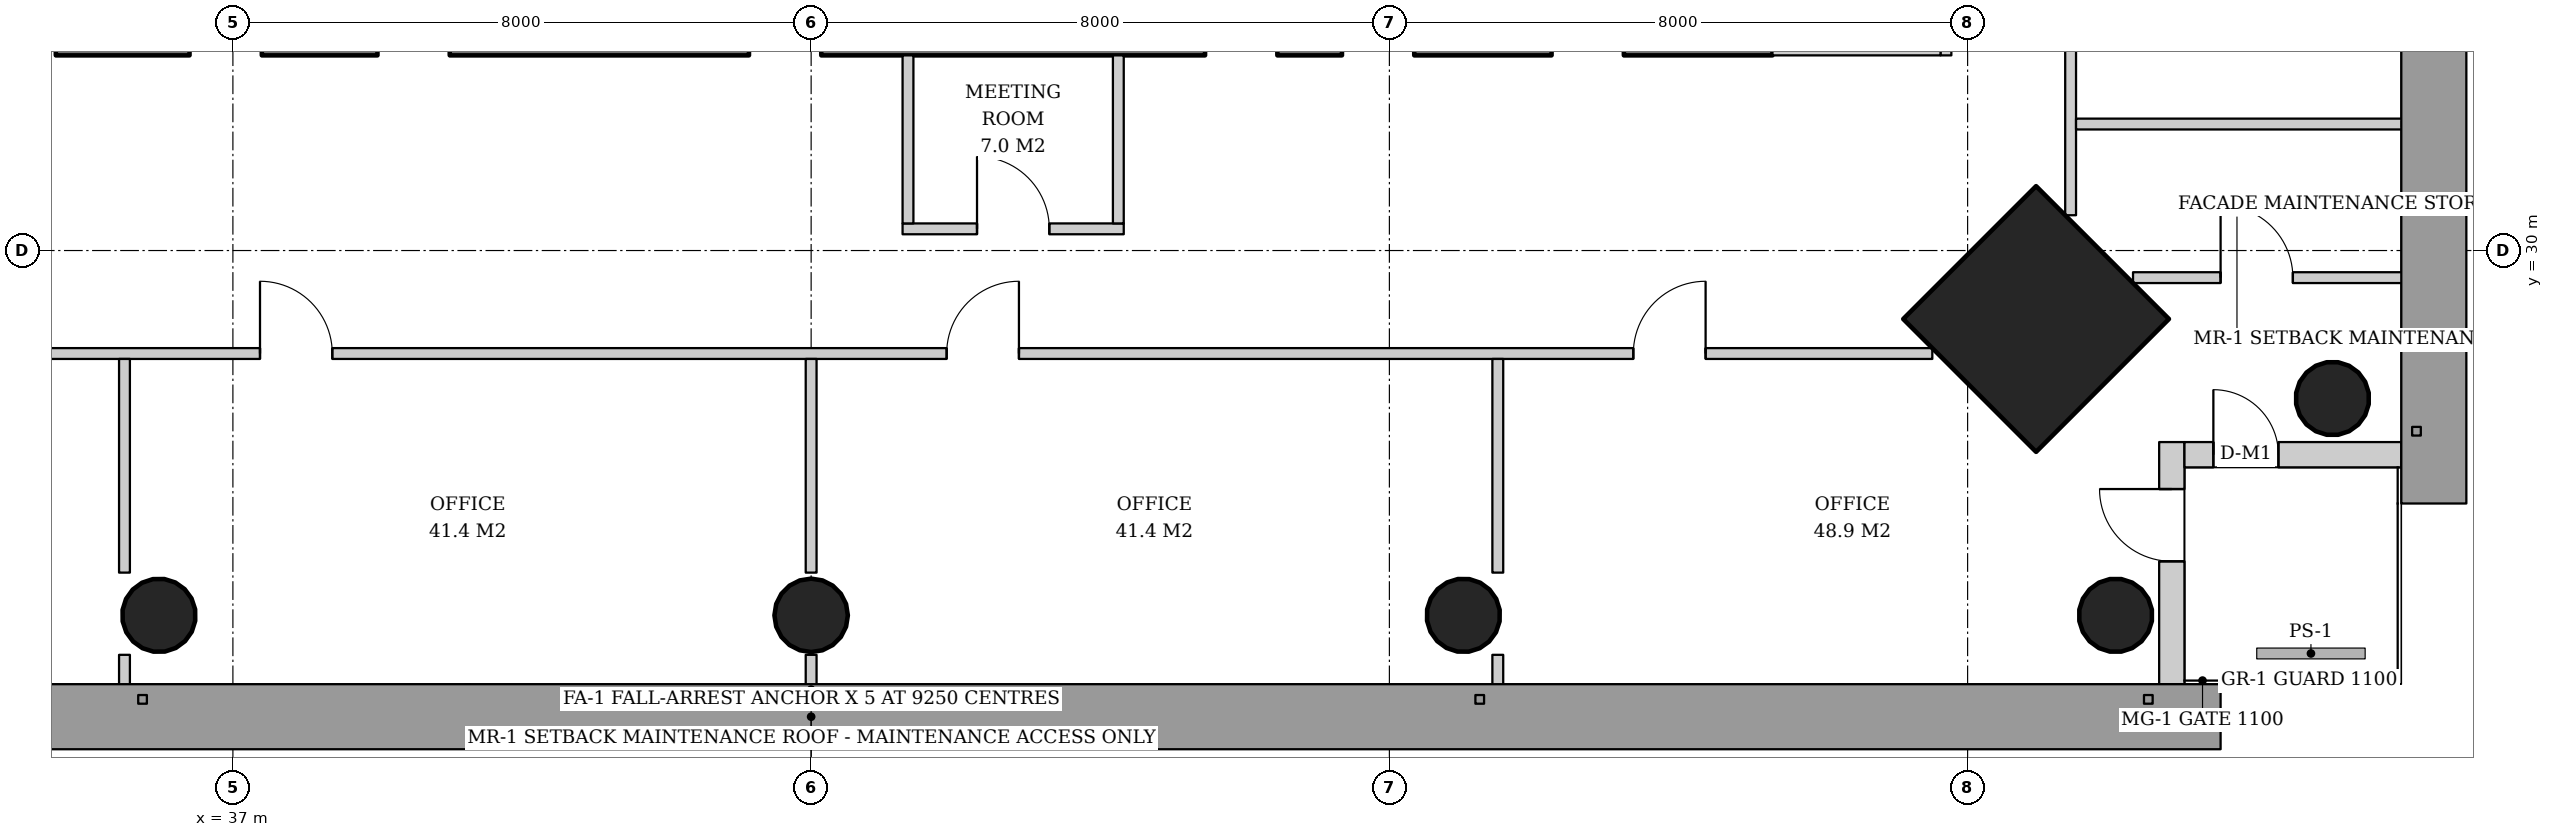
"""IFC4 building model, lengths in metres.
Left out: names, types, materials, properties, quantities, classifications, styles, units other than length and angle.
Written with IfcOpenShell. Run it as: python <this file> out.ifc"""

import sys

from ifc_helpers import new_model, si_unit, direction, frame, frame_2d, origin, origin_2d, place, context, subcontext, project, spatial, rectangle, hollow_circle, extrude, element, fill, save


model = new_model("IFC4")
c1 = context("Model", 3, precision=1e-05, world=origin(), true_north=direction((0.0, 1.0)))
c2 = subcontext(c1, "Body", "Model", "MODEL_VIEW")
j1 = project(units=[si_unit("LENGTHUNIT", "METRE"), si_unit("PLANEANGLEUNIT", "RADIAN")], contexts=[c1])
p1 = place(None, origin())
s1 = spatial("IfcSite", under=j1, at=p1, CompositionType="ELEMENT")
p2 = place(p1, origin())
s2 = spatial("IfcBuilding", under=s1, at=p2, CompositionType="ELEMENT")
p3 = place(p2, frame((0.0, 0.0, 112.2)))
s3 = spatial("IfcBuildingStorey", under=s2, at=p3, CompositionType="ELEMENT", Elevation=112.2)
p4 = place(p3, frame((66.086, 27.914, 0.0), z_axis=(-0.031898107953, 0.031898107953, 0.998981992539), x_axis=(-0.707106781187, -0.707106781187, 0.0)))
e1 = element("IfcColumn", 1, at=p4, inside=s3, PredefinedType="COLUMN", context=c2, shape_type="SweptSolid", body=[
    extrude(hollow_circle(Radius=0.508, WallThickness=0.04, at=origin_2d()), origin(), (0.0, 0.0, 1.0), 3.804),
])
p5 = place(p3, frame((61.986, 29.014, 0.0), z_axis=(-0.031898107953, 0.031898107953, 0.998981992539), x_axis=(-0.707106781187, -0.707106781187, 0.0)))
e2 = element("IfcColumn", 2, at=p5, inside=s3, PredefinedType="COLUMN", context=c2, shape_type="SweptSolid", body=[
    extrude(rectangle(XDim=2.6, YDim=2.6, at=origin_2d()), origin(), (0.0, 0.0, 1.0), 3.804),
])
p6 = place(p3, frame((63.086, 24.914, 0.0), z_axis=(-0.031898107953, 0.031898107953, 0.998981992539), x_axis=(-0.707106781187, -0.707106781187, 0.0)))
e3 = element("IfcColumn", 3, at=p6, inside=s3, PredefinedType="COLUMN", context=c2, shape_type="SweptSolid", body=[
    extrude(hollow_circle(Radius=0.508, WallThickness=0.04, at=origin_2d()), origin(), (0.0, 0.0, 1.0), 3.804),
])
p7 = place(p3, frame((35.957, 24.914, 0.0), z_axis=(0.015987237665, 0.031910269556, 0.999362868496), x_axis=(-0.894067115991, 0.447933021895, 0.0)))
e4 = element("IfcColumn", 4, at=p7, inside=s3, PredefinedType="COLUMN", context=c2, shape_type="SweptSolid", body=[
    extrude(hollow_circle(Radius=0.508, WallThickness=0.04, at=origin_2d()), origin(), (0.0, 0.0, 1.0), 3.802),
])
p8 = place(p3, frame((45.0, 24.914, 0.0), z_axis=(0.0, 0.031914348339, 0.999490607445), x_axis=(-1.0, 0.0, 0.0)))
e5 = element("IfcColumn", 5, at=p8, inside=s3, PredefinedType="COLUMN", context=c2, shape_type="SweptSolid", body=[
    extrude(hollow_circle(Radius=0.508, WallThickness=0.04, at=origin_2d()), origin(), (0.0, 0.0, 1.0), 3.802),
])
p9 = place(p3, frame((54.043, 24.914, 0.0), z_axis=(-0.015987237665, 0.031910269556, 0.999362868496), x_axis=(-0.894067115991, -0.447933021895, 0.0)))
e6 = element("IfcColumn", 6, at=p9, inside=s3, PredefinedType="COLUMN", context=c2, shape_type="SweptSolid", body=[
    extrude(hollow_circle(Radius=0.508, WallThickness=0.04, at=origin_2d()), origin(), (0.0, 0.0, 1.0), 3.802),
])
p10 = place(p3, frame((31.7, 33.05, 0.0), z_axis=(0.0, 0.0, 1.0), x_axis=(1.0, 0.0, 0.0)))
e7 = element("IfcWall", 7, at=p10, inside=s3, PredefinedType="SHEAR", context=c2, shape_type="SweptSolid", body=[
    extrude(rectangle(XDim=26.6, YDim=0.7, at=frame_2d((13.3, 0.0))), origin(), (0.0, 0.0, 1.0), 3.8),
])
p11 = place(p10, frame((7.3, 0.0, 0.0)))
e8 = element("IfcOpeningElement", 8, at=p11, cuts=e7, PredefinedType="OPENING", context=c2, shape_type="SweptSolid", body=[
    extrude(rectangle(XDim=1.0, YDim=2.1, at=frame_2d((0.5, 1.05))), frame((0.0, 0.36, 0.0), z_axis=(0.0, -1.0, 0.0), x_axis=(1.0, 0.0, 0.0)), (0.0, 0.0, 1.0), 0.72),
])
p12 = place(p10, frame((18.75, 0.0, 0.0)))
e9 = element("IfcOpeningElement", 9, at=p12, cuts=e7, PredefinedType="OPENING", context=c2, shape_type="SweptSolid", body=[
    extrude(rectangle(XDim=1.0, YDim=2.1, at=frame_2d((0.5, 1.05))), frame((0.0, 0.36, 0.0), z_axis=(0.0, -1.0, 0.0), x_axis=(1.0, 0.0, 0.0)), (0.0, 0.0, 1.0), 0.72),
])
p13 = place(p10, frame((1.85, 0.0, 0.0)))
e10 = element("IfcOpeningElement", 10, at=p13, cuts=e7, PredefinedType="OPENING", context=c2, shape_type="SweptSolid", body=[
    extrude(rectangle(XDim=1.0, YDim=2.1, at=frame_2d((0.5, 1.05))), frame((0.0, 0.36, 0.0), z_axis=(0.0, -1.0, 0.0), x_axis=(1.0, 0.0, 0.0)), (0.0, 0.0, 1.0), 0.72),
])
p14 = place(p10, frame((4.7, 0.0, 0.0)))
e11 = element("IfcOpeningElement", 11, at=p14, cuts=e7, PredefinedType="OPENING", context=c2, shape_type="SweptSolid", body=[
    extrude(rectangle(XDim=1.0, YDim=2.1, at=frame_2d((0.5, 1.05))), frame((0.0, 0.36, 0.0), z_axis=(0.0, -1.0, 0.0), x_axis=(1.0, 0.0, 0.0)), (0.0, 0.0, 1.0), 0.72),
])
p15 = place(p10, frame((12.44, 0.0, 0.0)))
e12 = element("IfcOpeningElement", 12, at=p15, cuts=e7, PredefinedType="OPENING", context=c2, shape_type="SweptSolid", body=[
    extrude(rectangle(XDim=1.0, YDim=2.1, at=frame_2d((0.5, 1.05))), frame((0.0, 0.36, 0.0), z_axis=(0.0, -1.0, 0.0), x_axis=(1.0, 0.0, 0.0)), (0.0, 0.0, 1.0), 0.72),
])
p16 = place(p10, frame((20.644, 0.0, 0.0)))
e13 = element("IfcOpeningElement", 13, at=p16, cuts=e7, PredefinedType="OPENING", context=c2, shape_type="SweptSolid", body=[
    extrude(rectangle(XDim=1.0, YDim=2.1, at=frame_2d((0.5, 1.05))), frame((0.0, 0.36, 0.0), z_axis=(0.0, -1.0, 0.0), x_axis=(1.0, 0.0, 0.0)), (0.0, 0.0, 1.0), 0.72),
])
p17 = place(p10, frame((23.544, 0.0, 0.0)))
e14 = element("IfcOpeningElement", 14, at=p17, cuts=e7, PredefinedType="OPENING", context=c2, shape_type="SweptSolid", body=[
    extrude(rectangle(XDim=1.0, YDim=2.1, at=frame_2d((0.5, 1.05))), frame((0.0, 0.36, 0.0), z_axis=(0.0, -1.0, 0.0), x_axis=(1.0, 0.0, 0.0)), (0.0, 0.0, 1.0), 0.72),
])
p18 = place(p3, frame((63.825, 24.0, 0.0), z_axis=(0.0, 0.0, 1.0), x_axis=(0.0, 1.0, 0.0)))
e15 = element("IfcWall", 15, at=p18, inside=s3, PredefinedType="SOLIDWALL", context=c2, shape_type="SweptSolid", body=[
    extrude(rectangle(XDim=3.35, YDim=0.35, at=frame_2d((1.675, 0.0))), origin(), (0.0, 0.0, 1.0), 3.62),
])
p19 = place(p18, frame((1.7, 0.0, 0.0)))
e16 = element("IfcOpeningElement", 16, at=p19, cuts=e15, PredefinedType="OPENING", context=c2, shape_type="SweptSolid", body=[
    extrude(rectangle(XDim=1.0, YDim=2.4, at=frame_2d((0.5, 1.2))), frame((0.0, 0.185, 0.0), z_axis=(0.0, -1.0, 0.0), x_axis=(1.0, 0.0, 0.0)), (0.0, 0.0, 1.0), 0.37),
])
p20 = place(p3, frame((64.0, 27.175, 0.0), z_axis=(0.0, 0.0, 1.0), x_axis=(1.0, 0.0, 0.0)))
e17 = element("IfcWall", 17, at=p20, inside=s3, PredefinedType="SOLIDWALL", context=c2, shape_type="SweptSolid", body=[
    extrude(rectangle(XDim=3.0, YDim=0.35, at=frame_2d((1.5, 0.0))), origin(), (0.0, 0.0, 1.0), 3.62),
])
p21 = place(p20, frame((0.4, 0.0, 0.0)))
e18 = element("IfcOpeningElement", 18, at=p21, cuts=e17, PredefinedType="OPENING", context=c2, shape_type="SweptSolid", body=[
    extrude(rectangle(XDim=0.9, YDim=2.1, at=frame_2d((0.45, 1.05))), frame((0.0, 0.185, 0.0), z_axis=(0.0, -1.0, 0.0), x_axis=(1.0, 0.0, 0.0)), (0.0, 0.0, 1.0), 0.37),
])
p22 = place(p3, frame((60.7, 32.7, 0.0), z_axis=(0.0, 0.0, 1.0), x_axis=(0.0, 1.0, 0.0)))
e19 = element("IfcWall", 19, at=p22, inside=s3, PredefinedType="PARTITIONING", context=c2, shape_type="SweptSolid", body=[
    extrude(rectangle(XDim=11.275, YDim=0.15, at=frame_2d((5.638, 0.0))), origin(), (0.0, 0.0, 1.0), 2.72),
])
p23 = place(p22, frame((5.137, 0.0, 0.0)))
e20 = element("IfcOpeningElement", 20, at=p23, cuts=e19, PredefinedType="OPENING", context=c2, shape_type="SweptSolid", body=[
    extrude(rectangle(XDim=1.0, YDim=2.1, at=frame_2d((0.5, 1.05))), frame((0.0, 0.085, 0.0), z_axis=(0.0, -1.0, 0.0), x_axis=(1.0, 0.0, 0.0)), (0.0, 0.0, 1.0), 0.17),
])
p24 = place(p3, frame((58.3, 32.775, 0.0), z_axis=(0.0, 0.0, 1.0), x_axis=(1.0, 0.0, 0.0)))
e21 = element("IfcWall", 21, at=p24, inside=s3, PredefinedType="PARTITIONING", context=c2, shape_type="SweptSolid", body=[
    extrude(rectangle(XDim=2.325, YDim=0.15, at=frame_2d((1.163, 0.0))), origin(), (0.0, 0.0, 1.0), 3.62),
])
p25 = place(p3, frame((46.265, 30.3, 0.0), z_axis=(0.0, 0.0, 1.0), x_axis=(1.0, 0.0, 0.0)))
e22 = element("IfcWall", 22, at=p25, inside=s3, PredefinedType="PARTITIONING", context=c2, shape_type="SweptSolid", body=[
    extrude(rectangle(XDim=3.06, YDim=0.15, at=frame_2d((1.53, 0.0))), origin(), (0.0, 0.0, 1.0), 2.858),
])
p26 = place(p25, frame((1.03, 0.0, 0.0)))
e23 = element("IfcOpeningElement", 23, at=p26, cuts=e22, PredefinedType="OPENING", context=c2, shape_type="SweptSolid", body=[
    extrude(rectangle(XDim=1.0, YDim=2.1, at=frame_2d((0.5, 1.05))), frame((0.0, 0.085, 0.0), z_axis=(0.0, -1.0, 0.0), x_axis=(1.0, 0.0, 0.0)), (0.0, 0.0, 1.0), 0.17),
])
for number, where, z_axis, x_axis in (
    (24, (46.34, 32.7, 0.0), (0.0, 0.0, 1.0), (0.0, -1.0, 0.0)),
    (25, (49.25, 32.7, 0.0), (0.0, 0.0, 1.0), (0.0, -1.0, 0.0)),
):
    element("IfcWall", number, at=place(p3, frame(where, z_axis=z_axis, x_axis=x_axis)), inside=s3, PredefinedType="PARTITIONING", context=c2, shape_type="SweptSolid", body=[
        extrude(rectangle(XDim=2.325, YDim=0.15, at=frame_2d((1.163, 0.0))), origin(), (0.0, 0.0, 1.0), 3.62),
    ])
p27 = place(p3, frame((62.425, 30.489, 0.0), z_axis=(0.0, 0.0, 1.0), x_axis=(0.0, 1.0, 0.0)))
e26 = element("IfcWall", 26, at=p27, inside=s3, PredefinedType="PARTITIONING", context=c2, shape_type="SweptSolid", body=[
    extrude(rectangle(XDim=31.023, YDim=0.15, at=frame_2d((15.511, 0.0))), origin(), (0.0, 0.0, 1.0), 2.72),
])
p28 = place(p27, frame((3.136, 0.0, 0.0)))
e27 = element("IfcOpeningElement", 27, at=p28, cuts=e26, PredefinedType="OPENING", context=c2, shape_type="SweptSolid", body=[
    extrude(rectangle(XDim=1.0, YDim=2.1, at=frame_2d((0.5, 1.05))), frame((0.0, 0.085, 0.0), z_axis=(0.0, -1.0, 0.0), x_axis=(1.0, 0.0, 0.0)), (0.0, 0.0, 1.0), 0.17),
])
p29 = place(p27, frame((7.886, 0.0, 0.0)))
e28 = element("IfcOpeningElement", 28, at=p29, cuts=e26, PredefinedType="OPENING", context=c2, shape_type="SweptSolid", body=[
    extrude(rectangle(XDim=1.0, YDim=2.1, at=frame_2d((0.5, 1.05))), frame((0.0, 0.085, 0.0), z_axis=(0.0, -1.0, 0.0), x_axis=(1.0, 0.0, 0.0)), (0.0, 0.0, 1.0), 0.17),
])
p30 = place(p27, frame((12.636, 0.0, 0.0)))
e29 = element("IfcOpeningElement", 29, at=p30, cuts=e26, PredefinedType="OPENING", context=c2, shape_type="SweptSolid", body=[
    extrude(rectangle(XDim=1.0, YDim=2.1, at=frame_2d((0.5, 1.05))), frame((0.0, 0.085, 0.0), z_axis=(0.0, -1.0, 0.0), x_axis=(1.0, 0.0, 0.0)), (0.0, 0.0, 1.0), 0.17),
])
p31 = place(p27, frame((17.386, 0.0, 0.0)))
e30 = element("IfcOpeningElement", 30, at=p31, cuts=e26, PredefinedType="OPENING", context=c2, shape_type="SweptSolid", body=[
    extrude(rectangle(XDim=1.0, YDim=2.1, at=frame_2d((0.5, 1.05))), frame((0.0, 0.085, 0.0), z_axis=(0.0, -1.0, 0.0), x_axis=(1.0, 0.0, 0.0)), (0.0, 0.0, 1.0), 0.17),
])
p32 = place(p27, frame((22.136, 0.0, 0.0)))
e31 = element("IfcOpeningElement", 31, at=p32, cuts=e26, PredefinedType="OPENING", context=c2, shape_type="SweptSolid", body=[
    extrude(rectangle(XDim=1.0, YDim=2.1, at=frame_2d((0.5, 1.05))), frame((0.0, 0.085, 0.0), z_axis=(0.0, -1.0, 0.0), x_axis=(1.0, 0.0, 0.0)), (0.0, 0.0, 1.0), 0.17),
])
p33 = place(p3, frame((62.5, 31.75, 0.0), z_axis=(0.0, 0.0, 1.0), x_axis=(1.0, 0.0, 0.0)))
e32 = element("IfcWall", 32, at=p33, inside=s3, PredefinedType="PARTITIONING", context=c2, shape_type="SweptSolid", body=[
    extrude(rectangle(XDim=4.54, YDim=0.15, at=frame_2d((2.27, 0.0))), origin(), (0.0, 0.0, 1.0), 2.82),
])
p34 = place(p3, frame((29.489, 28.575, 0.0), z_axis=(0.0, 0.0, 1.0), x_axis=(1.0, 0.0, 0.0)))
e33 = element("IfcWall", 33, at=p34, inside=s3, PredefinedType="PARTITIONING", context=c2, shape_type="SweptSolid", body=[
    extrude(rectangle(XDim=31.023, YDim=0.15, at=frame_2d((15.511, 0.0))), origin(), (0.0, 0.0, 1.0), 2.72),
])
p35 = place(p34, frame((3.136, 0.0, 0.0)))
e34 = element("IfcOpeningElement", 34, at=p35, cuts=e33, PredefinedType="OPENING", context=c2, shape_type="SweptSolid", body=[
    extrude(rectangle(XDim=1.0, YDim=2.1, at=frame_2d((0.5, 1.05))), frame((0.0, 0.085, 0.0), z_axis=(0.0, -1.0, 0.0), x_axis=(1.0, 0.0, 0.0)), (0.0, 0.0, 1.0), 0.17),
])
p36 = place(p34, frame((7.886, 0.0, 0.0)))
e35 = element("IfcOpeningElement", 35, at=p36, cuts=e33, PredefinedType="OPENING", context=c2, shape_type="SweptSolid", body=[
    extrude(rectangle(XDim=1.0, YDim=2.1, at=frame_2d((0.5, 1.05))), frame((0.0, 0.085, 0.0), z_axis=(0.0, -1.0, 0.0), x_axis=(1.0, 0.0, 0.0)), (0.0, 0.0, 1.0), 0.17),
])
p37 = place(p34, frame((17.386, 0.0, 0.0)))
e36 = element("IfcOpeningElement", 36, at=p37, cuts=e33, PredefinedType="OPENING", context=c2, shape_type="SweptSolid", body=[
    extrude(rectangle(XDim=1.0, YDim=2.1, at=frame_2d((0.5, 1.05))), frame((0.0, 0.085, 0.0), z_axis=(0.0, -1.0, 0.0), x_axis=(1.0, 0.0, 0.0)), (0.0, 0.0, 1.0), 0.17),
])
p38 = place(p34, frame((26.886, 0.0, 0.0)))
e37 = element("IfcOpeningElement", 37, at=p38, cuts=e33, PredefinedType="OPENING", context=c2, shape_type="SweptSolid", body=[
    extrude(rectangle(XDim=1.0, YDim=2.1, at=frame_2d((0.5, 1.05))), frame((0.0, 0.085, 0.0), z_axis=(0.0, -1.0, 0.0), x_axis=(1.0, 0.0, 0.0)), (0.0, 0.0, 1.0), 0.17),
])
p39 = place(p3, frame((35.5, 28.5, 0.0), z_axis=(0.0, 0.0, 1.0), x_axis=(0.0, -1.0, 0.0)))
e38 = element("IfcWall", 38, at=p39, inside=s3, PredefinedType="PARTITIONING", context=c2, shape_type="SweptSolid", body=[
    extrude(rectangle(XDim=2.956, YDim=0.15, at=frame_2d((1.478, 0.0))), origin(), (0.0, 0.0, 1.0), 3.62),
])
p40 = place(p3, frame((35.5, 24.406, 0.0), z_axis=(0.0, 0.0, 1.0), x_axis=(0.0, -1.0, 0.0)))
e39 = element("IfcWall", 39, at=p40, inside=s3, PredefinedType="PARTITIONING", context=c2, shape_type="SweptSolid", body=[
    extrude(rectangle(XDim=0.446, YDim=0.15, at=frame_2d((0.223, 0.0))), origin(), (0.0, 0.0, 1.0), 3.62),
])
p41 = place(p3, frame((45.0, 28.5, 0.0), z_axis=(0.0, 0.0, 1.0), x_axis=(0.0, -1.0, 0.0)))
e40 = element("IfcWall", 40, at=p41, inside=s3, PredefinedType="PARTITIONING", context=c2, shape_type="SweptSolid", body=[
    extrude(rectangle(XDim=2.956, YDim=0.15, at=frame_2d((1.478, 0.0))), origin(), (0.0, 0.0, 1.0), 3.62),
])
p42 = place(p3, frame((45.0, 24.406, 0.0), z_axis=(0.0, 0.0, 1.0), x_axis=(0.0, -1.0, 0.0)))
e41 = element("IfcWall", 41, at=p42, inside=s3, PredefinedType="PARTITIONING", context=c2, shape_type="SweptSolid", body=[
    extrude(rectangle(XDim=0.446, YDim=0.15, at=frame_2d((0.223, 0.0))), origin(), (0.0, 0.0, 1.0), 3.62),
])
p43 = place(p3, frame((54.5, 28.5, 0.0), z_axis=(0.0, 0.0, 1.0), x_axis=(0.0, -1.0, 0.0)))
e42 = element("IfcWall", 42, at=p43, inside=s3, PredefinedType="PARTITIONING", context=c2, shape_type="SweptSolid", body=[
    extrude(rectangle(XDim=2.956, YDim=0.15, at=frame_2d((1.478, 0.0))), origin(), (0.0, 0.0, 1.0), 3.62),
])
p44 = place(p3, frame((54.5, 24.406, 0.0), z_axis=(0.0, 0.0, 1.0), x_axis=(0.0, -1.0, 0.0)))
e43 = element("IfcWall", 43, at=p44, inside=s3, PredefinedType="PARTITIONING", context=c2, shape_type="SweptSolid", body=[
    extrude(rectangle(XDim=0.446, YDim=0.15, at=frame_2d((0.223, 0.0))), origin(), (0.0, 0.0, 1.0), 3.62),
])
p45 = place(p3, frame((63.289, 29.625, 0.0), z_axis=(0.0, 0.0, 1.0), x_axis=(1.0, 0.0, 0.0)))
e44 = element("IfcWall", 44, at=p45, inside=s3, PredefinedType="PARTITIONING", context=c2, shape_type="SweptSolid", body=[
    extrude(rectangle(XDim=3.751, YDim=0.15, at=frame_2d((1.876, 0.0))), origin(), (0.0, 0.0, 1.0), 2.82),
])
p46 = place(p45, frame((1.211, 0.0, 0.0)))
e45 = element("IfcOpeningElement", 45, at=p46, cuts=e44, PredefinedType="OPENING", context=c2, shape_type="SweptSolid", body=[
    extrude(rectangle(XDim=1.0, YDim=2.1, at=frame_2d((0.5, 1.05))), frame((0.0, 0.085, 0.0), z_axis=(0.0, -1.0, 0.0), x_axis=(1.0, 0.0, 0.0)), (0.0, 0.0, 1.0), 0.17),
])
p47 = place(p21, origin())
e46 = element("IfcDoor", 46, at=p47, inside=s3, OperationType="SINGLE_SWING_LEFT", PredefinedType="DOOR", context=c2, shape_type="SweptSolid", body=[
    extrude(rectangle(XDim=0.9, YDim=2.1, at=frame_2d((0.45, 1.05))), frame((0.0, 0.025, 0.0), z_axis=(0.0, -1.0, 0.0), x_axis=(1.0, 0.0, 0.0)), (0.0, 0.0, 1.0), 0.05),
])
fill(e18, e46)
p48 = place(p19, origin())
e47 = element("IfcDoor", 47, at=p48, inside=s3, OperationType="SINGLE_SWING_RIGHT", PredefinedType="DOOR", context=c2, shape_type="SweptSolid", body=[
    extrude(rectangle(XDim=1.0, YDim=2.4, at=frame_2d((0.5, 1.2))), frame((0.0, 0.025, 0.0), z_axis=(0.0, -1.0, 0.0), x_axis=(1.0, 0.0, 0.0)), (0.0, 0.0, 1.0), 0.05),
])
fill(e16, e47)
p49 = place(p26, origin())
e48 = element("IfcDoor", 48, at=p49, inside=s3, OperationType="SINGLE_SWING_LEFT", PredefinedType="DOOR", context=c2, shape_type="SweptSolid", body=[
    extrude(rectangle(XDim=1.0, YDim=2.1, at=frame_2d((0.5, 1.05))), frame((0.0, 0.025, 0.0), z_axis=(0.0, -1.0, 0.0), x_axis=(1.0, 0.0, 0.0)), (0.0, 0.0, 1.0), 0.05),
])
fill(e23, e48)
p50 = place(p36, origin())
e49 = element("IfcDoor", 49, at=p50, inside=s3, OperationType="SINGLE_SWING_LEFT", PredefinedType="DOOR", context=c2, shape_type="SweptSolid", body=[
    extrude(rectangle(XDim=1.0, YDim=2.1, at=frame_2d((0.5, 1.05))), frame((0.0, 0.025, 0.0), z_axis=(0.0, -1.0, 0.0), x_axis=(1.0, 0.0, 0.0)), (0.0, 0.0, 1.0), 0.05),
])
fill(e35, e49)
p51 = place(p37, origin())
e50 = element("IfcDoor", 50, at=p51, inside=s3, OperationType="SINGLE_SWING_RIGHT", PredefinedType="DOOR", context=c2, shape_type="SweptSolid", body=[
    extrude(rectangle(XDim=1.0, YDim=2.1, at=frame_2d((0.5, 1.05))), frame((0.0, 0.025, 0.0), z_axis=(0.0, -1.0, 0.0), x_axis=(1.0, 0.0, 0.0)), (0.0, 0.0, 1.0), 0.05),
])
fill(e36, e50)
p52 = place(p38, origin())
e51 = element("IfcDoor", 51, at=p52, inside=s3, OperationType="SINGLE_SWING_RIGHT", PredefinedType="DOOR", context=c2, shape_type="SweptSolid", body=[
    extrude(rectangle(XDim=1.0, YDim=2.1, at=frame_2d((0.5, 1.05))), frame((0.0, 0.025, 0.0), z_axis=(0.0, -1.0, 0.0), x_axis=(1.0, 0.0, 0.0)), (0.0, 0.0, 1.0), 0.05),
])
fill(e37, e51)
p53 = place(p46, origin())
e52 = element("IfcDoor", 52, at=p53, inside=s3, OperationType="SINGLE_SWING_LEFT", PredefinedType="DOOR", context=c2, shape_type="SweptSolid", body=[
    extrude(rectangle(XDim=1.0, YDim=2.1, at=frame_2d((0.5, 1.05))), frame((0.0, 0.025, 0.0), z_axis=(0.0, -1.0, 0.0), x_axis=(1.0, 0.0, 0.0)), (0.0, 0.0, 1.0), 0.05),
])
fill(e45, e52)
save(model, sys.argv[1])
